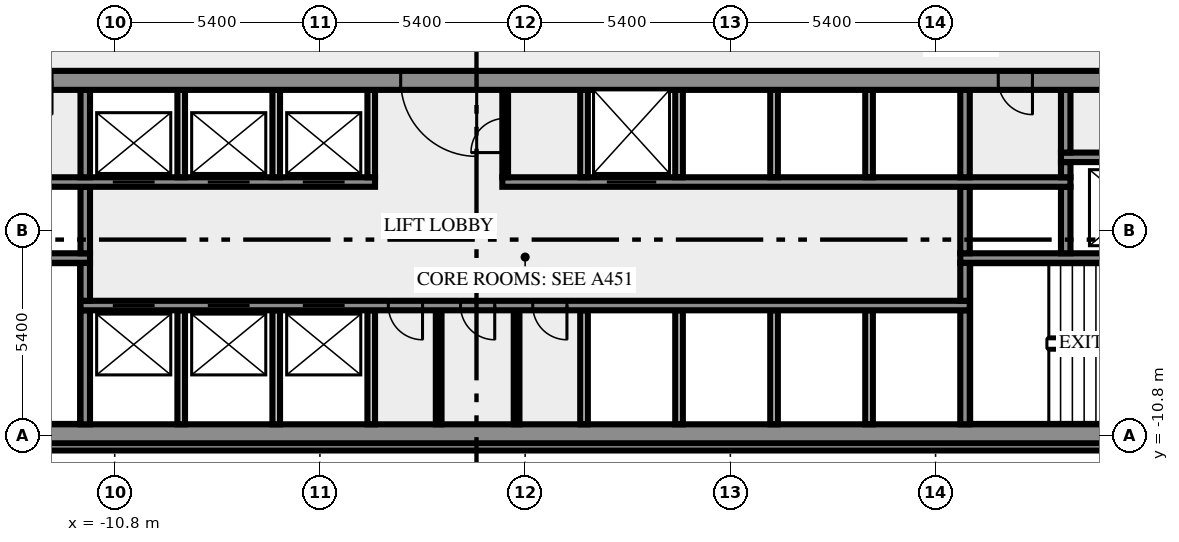
"""IFC4 building model, lengths in metres.
Left out: names, types, materials, properties, quantities, classifications, styles, units other than length and angle.
Written with IfcOpenShell. Run it as: python <this file> out.ifc"""

import sys

from ifc_helpers import new_model, si_unit, direction, frame, frame_2d, origin, place, context, subcontext, project, spatial, rectangle, extrude, element, fill, save


model = new_model("IFC4")
c1 = context("Model", 3, precision=1e-05, world=origin(), true_north=direction((0.0, 1.0)))
c2 = subcontext(c1, "Body", "Model", "MODEL_VIEW")
j1 = project(units=[si_unit("LENGTHUNIT", "METRE"), si_unit("PLANEANGLEUNIT", "RADIAN")], contexts=[c1])
p1 = place(None, origin())
s1 = spatial("IfcSite", under=j1, at=p1, CompositionType="ELEMENT")
p2 = place(p1, origin())
s2 = spatial("IfcBuilding", under=s1, at=p2, CompositionType="ELEMENT")
p3 = place(p2, frame((0.0, 0.0, 31.0)))
s3 = spatial("IfcBuildingStorey", under=s2, at=p3, CompositionType="ELEMENT", Elevation=31.0)
p4 = place(p3, frame((-17.444, -11.088, 0.0), z_axis=(0.0, 0.0, 1.0), x_axis=(1.0, 0.0, 0.0)))
e1 = element("IfcWall", 1, at=p4, inside=s3, PredefinedType="SOLIDWALL", context=c2, shape_type="SweptSolid", body=[
    extrude(rectangle(XDim=34.888, YDim=0.2, at=frame_2d((17.444, 0.0))), origin(), (0.0, 0.0, 1.0), 3.65),
])
p5 = place(p3, frame((-20.0, -10.75, 0.0), z_axis=(0.0, 0.0, 1.0), x_axis=(1.0, 0.0, 0.0)))
e2 = element("IfcWall", 2, at=p5, inside=s3, PredefinedType="SHEAR", context=c2, shape_type="SweptSolid", body=[
    extrude(rectangle(XDim=40.0, YDim=0.5, at=frame_2d((20.0, 0.0))), origin(), (0.0, 0.0, 1.0), 3.65),
])
p6 = place(p5, frame((0.8, 0.0, 1.0)))
e3 = element("IfcOpeningElement", 3, at=p6, cuts=e2, PredefinedType="OPENING", context=c2, shape_type="SweptSolid", body=[
    extrude(rectangle(XDim=1.2, YDim=1.2, at=frame_2d((0.6, 0.6))), frame((0.0, 0.26, 0.0), z_axis=(0.0, -1.0, 0.0), x_axis=(1.0, 0.0, 0.0)), (0.0, 0.0, 1.0), 0.52),
])
p7 = place(p5, frame((38.0, 0.0, 1.0)))
e4 = element("IfcOpeningElement", 4, at=p7, cuts=e2, PredefinedType="OPENING", context=c2, shape_type="SweptSolid", body=[
    extrude(rectangle(XDim=1.2, YDim=1.2, at=frame_2d((0.6, 0.6))), frame((0.0, 0.26, 0.0), z_axis=(0.0, -1.0, 0.0), x_axis=(1.0, 0.0, 0.0)), (0.0, 0.0, 1.0), 0.52),
])
p8 = place(p3, frame((-11.575, -10.5, 0.0), z_axis=(0.0, 0.0, 1.0), x_axis=(0.0, 1.0, 0.0)))
e5 = element("IfcWall", 5, at=p8, inside=s3, PredefinedType="SHEAR", context=c2, shape_type="SweptSolid", body=[
    extrude(rectangle(XDim=3.0, YDim=0.25, at=frame_2d((1.5, 0.0))), origin(), (0.0, 0.0, 1.0), 3.65),
])
for number, where, z_axis, x_axis in (
    (6, (-9.05, -10.5, 0.0), (0.0, 0.0, 1.0), (0.0, 1.0, 0.0)),
    (7, (-6.55, -10.5, 0.0), (0.0, 0.0, 1.0), (0.0, 1.0, 0.0)),
    (8, (-4.05, -10.5, 0.0), (0.0, 0.0, 1.0), (0.0, 1.0, 0.0)),
):
    element("IfcWall", number, at=place(p3, frame(where, z_axis=z_axis, x_axis=x_axis)), inside=s3, PredefinedType="SOLIDWALL", context=c2, shape_type="SweptSolid", body=[
        extrude(rectangle(XDim=3.0, YDim=0.2, at=frame_2d((1.5, 0.0))), origin(), (0.0, 0.0, 1.0), 3.65),
    ])
for number, where, z_axis, x_axis in (
    (9, (-2.275, -10.5, 0.0), (0.0, 0.0, 1.0), (0.0, 1.0, 0.0)),
    (10, (-0.225, -10.5, 0.0), (0.0, 0.0, 1.0), (0.0, 1.0, 0.0)),
):
    element("IfcWall", number, at=place(p3, frame(where, z_axis=z_axis, x_axis=x_axis)), inside=s3, PredefinedType="PARTITIONING", context=c2, shape_type="SweptSolid", body=[
        extrude(rectangle(XDim=3.0, YDim=0.15, at=frame_2d((1.5, 0.0))), origin(), (0.0, 0.0, 1.0), 3.65),
    ])
for number, where, z_axis, x_axis in (
    (11, (1.55, -10.5, 0.0), (0.0, 0.0, 1.0), (0.0, 1.0, 0.0)),
    (12, (4.05, -10.5, 0.0), (0.0, 0.0, 1.0), (0.0, 1.0, 0.0)),
    (13, (6.55, -10.5, 0.0), (0.0, 0.0, 1.0), (0.0, 1.0, 0.0)),
    (14, (9.05, -10.5, 0.0), (0.0, 0.0, 1.0), (0.0, 1.0, 0.0)),
):
    element("IfcWall", number, at=place(p3, frame(where, z_axis=z_axis, x_axis=x_axis)), inside=s3, PredefinedType="SOLIDWALL", context=c2, shape_type="SweptSolid", body=[
        extrude(rectangle(XDim=3.0, YDim=0.2, at=frame_2d((1.5, 0.0))), origin(), (0.0, 0.0, 1.0), 3.65),
    ])
p9 = place(p3, frame((11.575, -10.5, 0.0), z_axis=(0.0, 0.0, 1.0), x_axis=(0.0, 1.0, 0.0)))
e15 = element("IfcWall", 15, at=p9, inside=s3, PredefinedType="SHEAR", context=c2, shape_type="SweptSolid", body=[
    extrude(rectangle(XDim=3.0, YDim=0.25, at=frame_2d((1.5, 0.0))), origin(), (0.0, 0.0, 1.0), 3.65),
])
p10 = place(p3, frame((11.7, -7.375, 0.0), z_axis=(0.0, 0.0, 1.0), x_axis=(-1.0, 0.0, 0.0)))
e16 = element("IfcWall", 16, at=p10, inside=s3, PredefinedType="SHEAR", context=c2, shape_type="SweptSolid", body=[
    extrude(rectangle(XDim=23.4, YDim=0.25, at=frame_2d((11.7, 0.0))), origin(), (0.0, 0.0, 1.0), 3.65),
])
p11 = place(p10, frame((21.45, 0.0, 0.0)))
e17 = element("IfcOpeningElement", 17, at=p11, cuts=e16, PredefinedType="OPENING", context=c2, shape_type="SweptSolid", body=[
    extrude(rectangle(XDim=1.1, YDim=2.1, at=frame_2d((0.55, 1.05))), frame((0.0, 0.135, 0.0), z_axis=(0.0, -1.0, 0.0), x_axis=(1.0, 0.0, 0.0)), (0.0, 0.0, 1.0), 0.27),
])
p12 = place(p10, frame((18.95, 0.0, 0.0)))
e18 = element("IfcOpeningElement", 18, at=p12, cuts=e16, PredefinedType="OPENING", context=c2, shape_type="SweptSolid", body=[
    extrude(rectangle(XDim=1.1, YDim=2.1, at=frame_2d((0.55, 1.05))), frame((0.0, 0.135, 0.0), z_axis=(0.0, -1.0, 0.0), x_axis=(1.0, 0.0, 0.0)), (0.0, 0.0, 1.0), 0.27),
])
p13 = place(p10, frame((16.45, 0.0, 0.0)))
e19 = element("IfcOpeningElement", 19, at=p13, cuts=e16, PredefinedType="OPENING", context=c2, shape_type="SweptSolid", body=[
    extrude(rectangle(XDim=1.1, YDim=2.1, at=frame_2d((0.55, 1.05))), frame((0.0, 0.135, 0.0), z_axis=(0.0, -1.0, 0.0), x_axis=(1.0, 0.0, 0.0)), (0.0, 0.0, 1.0), 0.27),
])
p14 = place(p10, frame((14.4, 0.0, 0.0)))
e20 = element("IfcOpeningElement", 20, at=p14, cuts=e16, PredefinedType="OPENING", context=c2, shape_type="SweptSolid", body=[
    extrude(rectangle(XDim=0.9, YDim=2.1, at=frame_2d((0.45, 1.05))), frame((0.0, 0.135, 0.0), z_axis=(0.0, -1.0, 0.0), x_axis=(1.0, 0.0, 0.0)), (0.0, 0.0, 1.0), 0.27),
])
p15 = place(p10, frame((12.5, 0.0, 0.0)))
e21 = element("IfcOpeningElement", 21, at=p15, cuts=e16, PredefinedType="OPENING", context=c2, shape_type="SweptSolid", body=[
    extrude(rectangle(XDim=0.9, YDim=2.1, at=frame_2d((0.45, 1.05))), frame((0.0, 0.135, 0.0), z_axis=(0.0, -1.0, 0.0), x_axis=(1.0, 0.0, 0.0)), (0.0, 0.0, 1.0), 0.27),
])
p16 = place(p10, frame((10.6, 0.0, 0.0)))
e22 = element("IfcOpeningElement", 22, at=p16, cuts=e16, PredefinedType="OPENING", context=c2, shape_type="SweptSolid", body=[
    extrude(rectangle(XDim=0.9, YDim=2.1, at=frame_2d((0.45, 1.05))), frame((0.0, 0.135, 0.0), z_axis=(0.0, -1.0, 0.0), x_axis=(1.0, 0.0, 0.0)), (0.0, 0.0, 1.0), 0.27),
])
for number, where, z_axis, x_axis in (
    (23, (-11.575, -7.25, 0.0), (0.0, 0.0, 1.0), (0.0, 1.0, 0.0)),
    (24, (11.575, -7.25, 0.0), (0.0, 0.0, 1.0), (0.0, 1.0, 0.0)),
):
    element("IfcWall", number, at=place(p3, frame(where, z_axis=z_axis, x_axis=x_axis)), inside=s3, PredefinedType="SHEAR", context=c2, shape_type="SweptSolid", body=[
        extrude(rectangle(XDim=1.0, YDim=0.25, at=frame_2d((0.5, 0.0))), origin(), (0.0, 0.0, 1.0), 3.65),
    ])
p17 = place(p3, frame((-11.45, -6.125, 0.0), z_axis=(0.0, 0.0, 1.0), x_axis=(-1.0, 0.0, 0.0)))
e25 = element("IfcWall", 25, at=p17, inside=s3, PredefinedType="SHEAR", context=c2, shape_type="SweptSolid", body=[
    extrude(rectangle(XDim=8.05, YDim=0.25, at=frame_2d((4.025, 0.0))), origin(), (0.0, 0.0, 1.0), 3.65),
])
p18 = place(p17, frame((6.2, 0.0, 0.0)))
e26 = element("IfcOpeningElement", 26, at=p18, cuts=e25, PredefinedType="OPENING", context=c2, shape_type="SweptSolid", body=[
    extrude(rectangle(XDim=1.8, YDim=2.1, at=frame_2d((0.9, 1.05))), frame((0.0, 0.135, 0.0), z_axis=(0.0, -1.0, 0.0), x_axis=(1.0, 0.0, 0.0)), (0.0, 0.0, 1.0), 0.27),
])
p19 = place(p3, frame((19.5, -6.125, 0.0), z_axis=(0.0, 0.0, 1.0), x_axis=(-1.0, 0.0, 0.0)))
e27 = element("IfcWall", 27, at=p19, inside=s3, PredefinedType="SHEAR", context=c2, shape_type="SweptSolid", body=[
    extrude(rectangle(XDim=8.05, YDim=0.25, at=frame_2d((4.025, 0.0))), origin(), (0.0, 0.0, 1.0), 3.65),
])
p20 = place(p19, frame((0.05, 0.0, 0.0)))
e28 = element("IfcOpeningElement", 28, at=p20, cuts=e27, PredefinedType="OPENING", context=c2, shape_type="SweptSolid", body=[
    extrude(rectangle(XDim=1.8, YDim=2.1, at=frame_2d((0.9, 1.05))), frame((0.0, 0.135, 0.0), z_axis=(0.0, -1.0, 0.0), x_axis=(1.0, 0.0, 0.0)), (0.0, 0.0, 1.0), 0.27),
])
for number, where, z_axis, x_axis in (
    (29, (-11.575, -6.0, 0.0), (0.0, 0.0, 1.0), (0.0, 1.0, 0.0)),
    (30, (11.575, -6.0, 0.0), (0.0, 0.0, 1.0), (0.0, 1.0, 0.0)),
    (31, (14.225, -6.0, 0.0), (0.0, 0.0, 1.0), (0.0, 1.0, 0.0)),
):
    element("IfcWall", number, at=place(p3, frame(where, z_axis=z_axis, x_axis=x_axis)), inside=s3, PredefinedType="SHEAR", context=c2, shape_type="SweptSolid", body=[
        extrude(rectangle(XDim=1.75, YDim=0.25, at=frame_2d((0.875, 0.0))), origin(), (0.0, 0.0, 1.0), 3.65),
    ])
p21 = place(p3, frame((-14.35, -4.125, 0.0), z_axis=(0.0, 0.0, 1.0), x_axis=(1.0, 0.0, 0.0)))
e32 = element("IfcWall", 32, at=p21, inside=s3, PredefinedType="SHEAR", context=c2, shape_type="SweptSolid", body=[
    extrude(rectangle(XDim=10.4, YDim=0.25, at=frame_2d((5.2, 0.0))), origin(), (0.0, 0.0, 1.0), 3.65),
])
p22 = place(p21, frame((3.5, 0.0, 0.0)))
e33 = element("IfcOpeningElement", 33, at=p22, cuts=e32, PredefinedType="OPENING", context=c2, shape_type="SweptSolid", body=[
    extrude(rectangle(XDim=1.1, YDim=2.1, at=frame_2d((0.55, 1.05))), frame((0.0, 0.135, 0.0), z_axis=(0.0, -1.0, 0.0), x_axis=(1.0, 0.0, 0.0)), (0.0, 0.0, 1.0), 0.27),
])
p23 = place(p21, frame((6.0, 0.0, 0.0)))
e34 = element("IfcOpeningElement", 34, at=p23, cuts=e32, PredefinedType="OPENING", context=c2, shape_type="SweptSolid", body=[
    extrude(rectangle(XDim=1.1, YDim=2.1, at=frame_2d((0.55, 1.05))), frame((0.0, 0.135, 0.0), z_axis=(0.0, -1.0, 0.0), x_axis=(1.0, 0.0, 0.0)), (0.0, 0.0, 1.0), 0.27),
])
p24 = place(p21, frame((8.5, 0.0, 0.0)))
e35 = element("IfcOpeningElement", 35, at=p24, cuts=e32, PredefinedType="OPENING", context=c2, shape_type="SweptSolid", body=[
    extrude(rectangle(XDim=1.1, YDim=2.1, at=frame_2d((0.55, 1.05))), frame((0.0, 0.135, 0.0), z_axis=(0.0, -1.0, 0.0), x_axis=(1.0, 0.0, 0.0)), (0.0, 0.0, 1.0), 0.27),
])
p25 = place(p3, frame((-0.6, -4.125, 0.0), z_axis=(0.0, 0.0, 1.0), x_axis=(1.0, 0.0, 0.0)))
e36 = element("IfcWall", 36, at=p25, inside=s3, PredefinedType="SHEAR", context=c2, shape_type="SweptSolid", body=[
    extrude(rectangle(XDim=14.95, YDim=0.25, at=frame_2d((7.475, 0.0))), origin(), (0.0, 0.0, 1.0), 3.65),
])
p26 = place(p25, frame((2.75, 0.0, 0.0)))
e37 = element("IfcOpeningElement", 37, at=p26, cuts=e36, PredefinedType="OPENING", context=c2, shape_type="SweptSolid", body=[
    extrude(rectangle(XDim=1.3, YDim=2.1, at=frame_2d((0.65, 1.05))), frame((0.0, 0.135, 0.0), z_axis=(0.0, -1.0, 0.0), x_axis=(1.0, 0.0, 0.0)), (0.0, 0.0, 1.0), 0.27),
])
p27 = place(p3, frame((-11.575, -4.0, 0.0), z_axis=(0.0, 0.0, 1.0), x_axis=(0.0, 1.0, 0.0)))
e38 = element("IfcWall", 38, at=p27, inside=s3, PredefinedType="SHEAR", context=c2, shape_type="SweptSolid", body=[
    extrude(rectangle(XDim=2.3, YDim=0.25, at=frame_2d((1.15, 0.0))), origin(), (0.0, 0.0, 1.0), 3.65),
])
for number, where, z_axis, x_axis in (
    (39, (-9.05, -4.0, 0.0), (0.0, 0.0, 1.0), (0.0, 1.0, 0.0)),
    (40, (-6.55, -4.0, 0.0), (0.0, 0.0, 1.0), (0.0, 1.0, 0.0)),
    (41, (-4.05, -4.0, 0.0), (0.0, 0.0, 1.0), (0.0, 1.0, 0.0)),
):
    element("IfcWall", number, at=place(p3, frame(where, z_axis=z_axis, x_axis=x_axis)), inside=s3, PredefinedType="SOLIDWALL", context=c2, shape_type="SweptSolid", body=[
        extrude(rectangle(XDim=2.3, YDim=0.2, at=frame_2d((1.15, 0.0))), origin(), (0.0, 0.0, 1.0), 3.65),
    ])
p28 = place(p3, frame((-0.525, -4.0, 0.0), z_axis=(0.0, 0.0, 1.0), x_axis=(0.0, 1.0, 0.0)))
e42 = element("IfcWall", 42, at=p28, inside=s3, PredefinedType="PARTITIONING", context=c2, shape_type="SweptSolid", body=[
    extrude(rectangle(XDim=2.3, YDim=0.15, at=frame_2d((1.15, 0.0))), origin(), (0.0, 0.0, 1.0), 3.65),
])
p29 = place(p28, frame((0.65, 0.0, 0.0)))
e43 = element("IfcOpeningElement", 43, at=p29, cuts=e42, PredefinedType="OPENING", context=c2, shape_type="SweptSolid", body=[
    extrude(rectangle(XDim=0.9, YDim=2.1, at=frame_2d((0.45, 1.05))), frame((0.0, 0.085, 0.0), z_axis=(0.0, -1.0, 0.0), x_axis=(1.0, 0.0, 0.0)), (0.0, 0.0, 1.0), 0.17),
])
for number, where, z_axis, x_axis in (
    (44, (1.55, -4.0, 0.0), (0.0, 0.0, 1.0), (0.0, 1.0, 0.0)),
    (45, (4.05, -4.0, 0.0), (0.0, 0.0, 1.0), (0.0, 1.0, 0.0)),
    (46, (6.55, -4.0, 0.0), (0.0, 0.0, 1.0), (0.0, 1.0, 0.0)),
    (47, (9.05, -4.0, 0.0), (0.0, 0.0, 1.0), (0.0, 1.0, 0.0)),
):
    element("IfcWall", number, at=place(p3, frame(where, z_axis=z_axis, x_axis=x_axis)), inside=s3, PredefinedType="SOLIDWALL", context=c2, shape_type="SweptSolid", body=[
        extrude(rectangle(XDim=2.3, YDim=0.2, at=frame_2d((1.15, 0.0))), origin(), (0.0, 0.0, 1.0), 3.65),
    ])
p30 = place(p3, frame((11.575, -4.0, 0.0), z_axis=(0.0, 0.0, 1.0), x_axis=(0.0, 1.0, 0.0)))
e48 = element("IfcWall", 48, at=p30, inside=s3, PredefinedType="SHEAR", context=c2, shape_type="SweptSolid", body=[
    extrude(rectangle(XDim=2.3, YDim=0.25, at=frame_2d((1.15, 0.0))), origin(), (0.0, 0.0, 1.0), 3.65),
])
p31 = place(p3, frame((14.225, -4.0, 0.0), z_axis=(0.0, 0.0, 1.0), x_axis=(0.0, 1.0, 0.0)))
e49 = element("IfcWall", 49, at=p31, inside=s3, PredefinedType="SHEAR", context=c2, shape_type="SweptSolid", body=[
    extrude(rectangle(XDim=0.4, YDim=0.25, at=frame_2d((0.2, 0.0))), origin(), (0.0, 0.0, 1.0), 3.65),
])
p32 = place(p3, frame((14.1, -3.475, 0.0), z_axis=(0.0, 0.0, 1.0), x_axis=(1.0, 0.0, 0.0)))
e50 = element("IfcWall", 50, at=p32, inside=s3, PredefinedType="SHEAR", context=c2, shape_type="SweptSolid", body=[
    extrude(rectangle(XDim=3.25, YDim=0.25, at=frame_2d((1.625, 0.0))), origin(), (0.0, 0.0, 1.0), 3.65),
])
p33 = place(p3, frame((14.225, -3.35, 0.0), z_axis=(0.0, 0.0, 1.0), x_axis=(0.0, 1.0, 0.0)))
e51 = element("IfcWall", 51, at=p33, inside=s3, PredefinedType="SHEAR", context=c2, shape_type="SweptSolid", body=[
    extrude(rectangle(XDim=1.65, YDim=0.25, at=frame_2d((0.825, 0.0))), origin(), (0.0, 0.0, 1.0), 3.65),
])
p34 = place(p3, frame((20.49, -1.45, 0.0), z_axis=(0.0, 0.0, 1.0), x_axis=(-1.0, 0.0, 0.0)))
e52 = element("IfcWall", 52, at=p34, inside=s3, PredefinedType="SHEAR", context=c2, shape_type="SweptSolid", body=[
    extrude(rectangle(XDim=40.98, YDim=0.5, at=frame_2d((20.49, 0.0))), origin(), (0.0, 0.0, 1.0), 3.65),
])
p35 = place(p34, frame((38.14, 0.0, 0.0)))
e53 = element("IfcOpeningElement", 53, at=p35, cuts=e52, PredefinedType="OPENING", context=c2, shape_type="SweptSolid", body=[
    extrude(rectangle(XDim=1.8, YDim=2.1, at=frame_2d((0.9, 1.05))), frame((0.0, 0.26, 0.0), z_axis=(0.0, -1.0, 0.0), x_axis=(1.0, 0.0, 0.0)), (0.0, 0.0, 1.0), 0.52),
])
p36 = place(p34, frame((36.728, 0.0, 0.0)))
e54 = element("IfcOpeningElement", 54, at=p36, cuts=e52, PredefinedType="OPENING", context=c2, shape_type="SweptSolid", body=[
    extrude(rectangle(XDim=0.8, YDim=2.1, at=frame_2d((0.4, 1.05))), frame((0.0, 0.26, 0.0), z_axis=(0.0, -1.0, 0.0), x_axis=(1.0, 0.0, 0.0)), (0.0, 0.0, 1.0), 0.52),
])
p37 = place(p34, frame((35.153, 0.0, 0.0)))
e55 = element("IfcOpeningElement", 55, at=p37, cuts=e52, PredefinedType="OPENING", context=c2, shape_type="SweptSolid", body=[
    extrude(rectangle(XDim=0.8, YDim=2.1, at=frame_2d((0.4, 1.05))), frame((0.0, 0.26, 0.0), z_axis=(0.0, -1.0, 0.0), x_axis=(1.0, 0.0, 0.0)), (0.0, 0.0, 1.0), 0.52),
])
p38 = place(p34, frame((32.94, 0.0, 0.0)))
e56 = element("IfcOpeningElement", 56, at=p38, cuts=e52, PredefinedType="OPENING", context=c2, shape_type="SweptSolid", body=[
    extrude(rectangle(XDim=0.9, YDim=2.1, at=frame_2d((0.45, 1.05))), frame((0.0, 0.26, 0.0), z_axis=(0.0, -1.0, 0.0), x_axis=(1.0, 0.0, 0.0)), (0.0, 0.0, 1.0), 0.52),
])
p39 = place(p34, frame((21.765, 0.0, 0.0)))
e57 = element("IfcOpeningElement", 57, at=p39, cuts=e52, PredefinedType="OPENING", context=c2, shape_type="SweptSolid", body=[
    extrude(rectangle(XDim=2.0, YDim=2.1, at=frame_2d((1.0, 1.05))), frame((0.0, 0.26, 0.0), z_axis=(0.0, -1.0, 0.0), x_axis=(1.0, 0.0, 0.0)), (0.0, 0.0, 1.0), 0.52),
])
p40 = place(p34, frame((7.14, 0.0, 0.0)))
e58 = element("IfcOpeningElement", 58, at=p40, cuts=e52, PredefinedType="OPENING", context=c2, shape_type="SweptSolid", body=[
    extrude(rectangle(XDim=0.9, YDim=2.1, at=frame_2d((0.45, 1.05))), frame((0.0, 0.26, 0.0), z_axis=(0.0, -1.0, 0.0), x_axis=(1.0, 0.0, 0.0)), (0.0, 0.0, 1.0), 0.52),
])
p41 = place(p34, frame((4.19, 0.0, 0.0)))
e59 = element("IfcOpeningElement", 59, at=p41, cuts=e52, PredefinedType="OPENING", context=c2, shape_type="SweptSolid", body=[
    extrude(rectangle(XDim=0.9, YDim=2.1, at=frame_2d((0.45, 1.05))), frame((0.0, 0.26, 0.0), z_axis=(0.0, -1.0, 0.0), x_axis=(1.0, 0.0, 0.0)), (0.0, 0.0, 1.0), 0.52),
])
p42 = place(p34, frame((1.04, 0.0, 0.0)))
e60 = element("IfcOpeningElement", 60, at=p42, cuts=e52, PredefinedType="OPENING", context=c2, shape_type="SweptSolid", body=[
    extrude(rectangle(XDim=1.8, YDim=2.1, at=frame_2d((0.9, 1.05))), frame((0.0, 0.26, 0.0), z_axis=(0.0, -1.0, 0.0), x_axis=(1.0, 0.0, 0.0)), (0.0, 0.0, 1.0), 0.52),
])
p43 = place(p11, origin())
e61 = element("IfcDoor", 61, at=p43, inside=s3, OperationType="DOUBLE_DOOR_SLIDING", PredefinedType="DOOR", context=c2, shape_type="SweptSolid", body=[
    extrude(rectangle(XDim=1.1, YDim=2.1, at=frame_2d((0.55, 1.05))), frame((0.0, 0.025, 0.0), z_axis=(0.0, -1.0, 0.0), x_axis=(1.0, 0.0, 0.0)), (0.0, 0.0, 1.0), 0.05),
])
fill(e17, e61)
p44 = place(p12, origin())
e62 = element("IfcDoor", 62, at=p44, inside=s3, OperationType="DOUBLE_DOOR_SLIDING", PredefinedType="DOOR", context=c2, shape_type="SweptSolid", body=[
    extrude(rectangle(XDim=1.1, YDim=2.1, at=frame_2d((0.55, 1.05))), frame((0.0, 0.025, 0.0), z_axis=(0.0, -1.0, 0.0), x_axis=(1.0, 0.0, 0.0)), (0.0, 0.0, 1.0), 0.05),
])
fill(e18, e62)
p45 = place(p13, origin())
e63 = element("IfcDoor", 63, at=p45, inside=s3, OperationType="DOUBLE_DOOR_SLIDING", PredefinedType="DOOR", context=c2, shape_type="SweptSolid", body=[
    extrude(rectangle(XDim=1.1, YDim=2.1, at=frame_2d((0.55, 1.05))), frame((0.0, 0.025, 0.0), z_axis=(0.0, -1.0, 0.0), x_axis=(1.0, 0.0, 0.0)), (0.0, 0.0, 1.0), 0.05),
])
fill(e19, e63)
p46 = place(p14, origin())
e64 = element("IfcDoor", 64, at=p46, inside=s3, OperationType="SINGLE_SWING_RIGHT", PredefinedType="DOOR", context=c2, shape_type="SweptSolid", body=[
    extrude(rectangle(XDim=0.9, YDim=2.1, at=frame_2d((0.45, 1.05))), frame((0.0, 0.025, 0.0), z_axis=(0.0, -1.0, 0.0), x_axis=(1.0, 0.0, 0.0)), (0.0, 0.0, 1.0), 0.05),
])
fill(e20, e64)
p47 = place(p15, origin())
e65 = element("IfcDoor", 65, at=p47, inside=s3, OperationType="SINGLE_SWING_RIGHT", PredefinedType="DOOR", context=c2, shape_type="SweptSolid", body=[
    extrude(rectangle(XDim=0.9, YDim=2.1, at=frame_2d((0.45, 1.05))), frame((0.0, 0.025, 0.0), z_axis=(0.0, -1.0, 0.0), x_axis=(1.0, 0.0, 0.0)), (0.0, 0.0, 1.0), 0.05),
])
fill(e21, e65)
p48 = place(p16, origin())
e66 = element("IfcDoor", 66, at=p48, inside=s3, OperationType="SINGLE_SWING_LEFT", PredefinedType="DOOR", context=c2, shape_type="SweptSolid", body=[
    extrude(rectangle(XDim=0.9, YDim=2.1, at=frame_2d((0.45, 1.05))), frame((0.0, 0.025, 0.0), z_axis=(0.0, -1.0, 0.0), x_axis=(1.0, 0.0, 0.0)), (0.0, 0.0, 1.0), 0.05),
])
fill(e22, e66)
p49 = place(p22, origin())
e67 = element("IfcDoor", 67, at=p49, inside=s3, OperationType="DOUBLE_DOOR_SLIDING", PredefinedType="DOOR", context=c2, shape_type="SweptSolid", body=[
    extrude(rectangle(XDim=1.1, YDim=2.1, at=frame_2d((0.55, 1.05))), frame((0.0, 0.025, 0.0), z_axis=(0.0, -1.0, 0.0), x_axis=(1.0, 0.0, 0.0)), (0.0, 0.0, 1.0), 0.05),
])
fill(e33, e67)
p50 = place(p23, origin())
e68 = element("IfcDoor", 68, at=p50, inside=s3, OperationType="DOUBLE_DOOR_SLIDING", PredefinedType="DOOR", context=c2, shape_type="SweptSolid", body=[
    extrude(rectangle(XDim=1.1, YDim=2.1, at=frame_2d((0.55, 1.05))), frame((0.0, 0.025, 0.0), z_axis=(0.0, -1.0, 0.0), x_axis=(1.0, 0.0, 0.0)), (0.0, 0.0, 1.0), 0.05),
])
fill(e34, e68)
p51 = place(p24, origin())
e69 = element("IfcDoor", 69, at=p51, inside=s3, OperationType="DOUBLE_DOOR_SLIDING", PredefinedType="DOOR", context=c2, shape_type="SweptSolid", body=[
    extrude(rectangle(XDim=1.1, YDim=2.1, at=frame_2d((0.55, 1.05))), frame((0.0, 0.025, 0.0), z_axis=(0.0, -1.0, 0.0), x_axis=(1.0, 0.0, 0.0)), (0.0, 0.0, 1.0), 0.05),
])
fill(e35, e69)
p52 = place(p26, origin())
e70 = element("IfcDoor", 70, at=p52, inside=s3, OperationType="DOUBLE_DOOR_SLIDING", PredefinedType="DOOR", context=c2, shape_type="SweptSolid", body=[
    extrude(rectangle(XDim=1.3, YDim=2.1, at=frame_2d((0.65, 1.05))), frame((0.0, 0.025, 0.0), z_axis=(0.0, -1.0, 0.0), x_axis=(1.0, 0.0, 0.0)), (0.0, 0.0, 1.0), 0.05),
])
fill(e37, e70)
p53 = place(p29, origin())
e71 = element("IfcDoor", 71, at=p53, inside=s3, OperationType="SINGLE_SWING_LEFT", PredefinedType="DOOR", context=c2, shape_type="SweptSolid", body=[
    extrude(rectangle(XDim=0.9, YDim=2.1, at=frame_2d((0.45, 1.05))), frame((0.0, 0.025, 0.0), z_axis=(0.0, -1.0, 0.0), x_axis=(1.0, 0.0, 0.0)), (0.0, 0.0, 1.0), 0.05),
])
fill(e43, e71)
p54 = place(p39, origin())
e72 = element("IfcDoor", 72, at=p54, inside=s3, OperationType="DOUBLE_DOOR_SINGLE_SWING", PredefinedType="DOOR", context=c2, shape_type="SweptSolid", body=[
    extrude(rectangle(XDim=2.0, YDim=2.1, at=frame_2d((1.0, 1.05))), frame((0.0, 0.025, 0.0), z_axis=(0.0, -1.0, 0.0), x_axis=(1.0, 0.0, 0.0)), (0.0, 0.0, 1.0), 0.05),
])
fill(e57, e72)
p55 = place(p40, origin())
e73 = element("IfcDoor", 73, at=p55, inside=s3, OperationType="SINGLE_SWING_LEFT", PredefinedType="DOOR", context=c2, shape_type="SweptSolid", body=[
    extrude(rectangle(XDim=0.9, YDim=2.1, at=frame_2d((0.45, 1.05))), frame((0.0, 0.025, 0.0), z_axis=(0.0, -1.0, 0.0), x_axis=(1.0, 0.0, 0.0)), (0.0, 0.0, 1.0), 0.05),
])
fill(e58, e73)
save(model, sys.argv[1])
